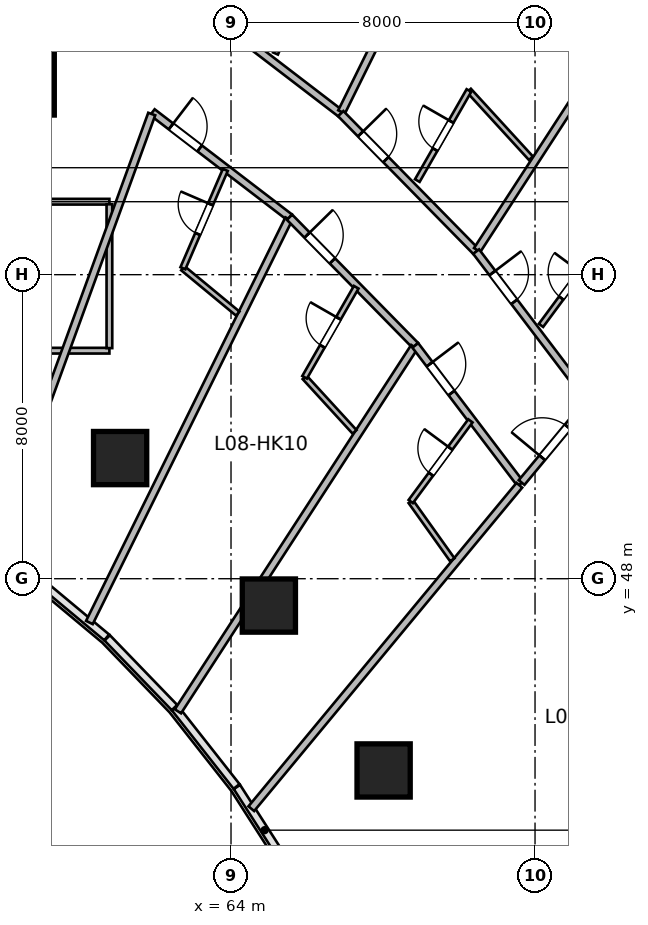
"""IFC4 building model, lengths in metres.
Left out: names, types, materials, properties, quantities, classifications, styles, units other than length and angle.
Written with IfcOpenShell. Run it as: python <this file> out.ifc"""

import sys

from ifc_helpers import new_model, si_unit, direction, frame, frame_2d, origin, origin_2d, place, context, subcontext, project, spatial, rectangle, circle, extrude, source, transform, mapped, element, fill, save


model = new_model("IFC4")
c1 = context("Model", 3, precision=1e-05, world=origin(), true_north=direction((0.0, 1.0)))
c2 = subcontext(c1, "Body", "Model", "MODEL_VIEW")
j1 = project(units=[si_unit("LENGTHUNIT", "METRE"), si_unit("PLANEANGLEUNIT", "RADIAN")], contexts=[c1])
p1 = place(None, origin())
s1 = spatial("IfcSite", under=j1, at=p1, CompositionType="ELEMENT")
p2 = place(p1, origin())
s2 = spatial("IfcBuilding", under=s1, at=p2, CompositionType="ELEMENT")
p3 = place(p2, frame((0.0, 0.0, 42.6)))
s3 = spatial("IfcBuildingStorey", under=s2, at=p3, CompositionType="ELEMENT", Elevation=42.6)
m1 = source(origin(), c2, "Body", "SweptSolid", [
    extrude(rectangle(XDim=12.0, YDim=0.55, at=frame_2d((6.0, 0.0))), origin(), (0.0, 0.0, 1.0), 3.6),
])
p4 = place(p3, frame((59.075, 60.2, 0.0), z_axis=(0.0, 0.0, 1.0), x_axis=(0.0, 1.0, 0.0)))
e1 = element("IfcWall", 1, at=p4, inside=s3, PredefinedType="SHEAR", context=c2, shape_type="MappedRepresentation", body=[
    mapped(m1, transform((0.0, 0.0, 0.0), scale=1.0)),
])
m2 = source(origin(), c2, "Body", "SweptSolid", [
    extrude(circle(Radius=0.7, at=origin_2d()), origin(), (0.0, 0.0, 1.0), 3.6),
])
for number, where, z_axis, x_axis in (
    (2, (61.082, 51.175, 0.0), (0.0, 0.0, 1.0), (0.409, 0.912, 0.0)),
    (3, (64.996, 47.294, 0.0), (0.0, 0.0, 1.0), (0.558, 0.83, 0.0)),
    (4, (68.015, 42.955, 0.0), (0.0, 0.0, 1.0), (0.691, 0.723, 0.0)),
):
    element("IfcColumn", number, at=place(p3, frame(where, z_axis=z_axis, x_axis=x_axis)), inside=s3, PredefinedType="COLUMN", context=c2, shape_type="MappedRepresentation", body=[
        mapped(m2, transform((0.0, 0.0, 0.0), scale=1.0)),
    ])
m3 = source(origin(), c2, "Body", "SweptSolid", [
    extrude(rectangle(XDim=6.6, YDim=0.15, at=frame_2d((3.3, 0.0))), origin(), (0.0, 0.0, 1.0), 2.803),
])
p5 = place(p3, frame((54.2, 54.0, 0.0), z_axis=(0.0, 0.0, 1.0), x_axis=(1.0, 0.0, 0.0)))
e5 = element("IfcWall", 5, at=p5, inside=s3, PredefinedType="PARTITIONING", context=c2, shape_type="MappedRepresentation", body=[
    mapped(m3, transform((0.0, 0.0, 0.0), scale=1.0)),
])
m4 = source(origin(), c2, "Body", "SweptSolid", [
    extrude(rectangle(XDim=6.6, YDim=0.15, at=frame_2d((3.3, 0.0))), origin(), (0.0, 0.0, 1.0), 3.36),
])
p6 = place(p3, frame((54.2, 57.92, 0.0), z_axis=(0.0, 0.0, 1.0), x_axis=(1.0, 0.0, 0.0)))
e6 = element("IfcWall", 6, at=p6, inside=s3, PredefinedType="PARTITIONING", context=c2, shape_type="MappedRepresentation", body=[
    mapped(m4, transform((0.0, 0.0, 0.0), scale=1.0)),
])
p7 = place(p6, frame((2.825, 0.0, 0.0)))
e7 = element("IfcOpeningElement", 7, at=p7, cuts=e6, PredefinedType="OPENING", context=c2, shape_type="SweptSolid", body=[
    extrude(rectangle(XDim=0.95, YDim=2.1, at=frame_2d((0.475, 1.05))), frame((0.0, 0.085, 0.0), z_axis=(0.0, -1.0, 0.0), x_axis=(1.0, 0.0, 0.0)), (0.0, 0.0, 1.0), 0.17),
])
m5 = source(origin(), c2, "Body", "SweptSolid", [
    extrude(rectangle(XDim=3.785, YDim=0.15, at=frame_2d((1.893, 0.0))), origin(), (0.0, 0.0, 1.0), 3.36),
])
p8 = place(p3, frame((60.8, 54.067, 0.0), z_axis=(0.0, 0.0, 1.0), x_axis=(0.0, 1.0, 0.0)))
e8 = element("IfcWall", 8, at=p8, inside=s3, PredefinedType="PARTITIONING", context=c2, shape_type="MappedRepresentation", body=[
    mapped(m5, transform((0.0, 0.0, 0.0), scale=1.0)),
])
m6 = source(origin(), c2, "Body", "SweptSolid", [
    extrude(rectangle(XDim=4.895, YDim=0.195, at=frame_2d((2.447, 0.0))), origin(), (0.0, 0.0, 1.0), 3.36),
])
p9 = place(p3, frame((63.001, 63.214, 0.0), z_axis=(0.0, 0.0, 1.0), x_axis=(0.793896075849, -0.608053468661, 0.0)))
e9 = element("IfcWall", 9, at=p9, inside=s3, PredefinedType="PARTITIONING", context=c2, shape_type="MappedRepresentation", body=[
    mapped(m6, transform((0.0, 0.0, 0.0), scale=1.0)),
])
p10 = place(p9, frame((0.7, 0.0, 0.0)))
e10 = element("IfcOpeningElement", 10, at=p10, cuts=e9, PredefinedType="OPENING", context=c2, shape_type="SweptSolid", body=[
    extrude(rectangle(XDim=0.95, YDim=2.15, at=frame_2d((0.475, 1.075))), frame((0.0, 0.107, 0.0), z_axis=(0.0, -1.0, 0.0), x_axis=(1.0, 0.0, 0.0)), (0.0, 0.0, 1.0), 0.215),
])
m7 = source(origin(), c2, "Body", "SweptSolid", [
    extrude(rectangle(XDim=11.77, YDim=0.195, at=frame_2d((5.885, 0.0))), origin(), (0.0, 0.0, 1.0), 3.36),
])
p11 = place(p3, frame((66.909, 60.282, 0.0), z_axis=(0.0, 0.0, 1.0), x_axis=(0.44286060326, 0.896590478468, 0.0)))
e11 = element("IfcWall", 11, at=p11, inside=s3, PredefinedType="PARTITIONING", context=c2, shape_type="MappedRepresentation", body=[
    mapped(m7, transform((0.0, 0.0, 0.0), scale=1.0)),
])
m8 = source(origin(), c2, "Body", "SweptSolid", [
    extrude(rectangle(XDim=2.818, YDim=0.14, at=frame_2d((1.409, 0.0))), origin(), (0.0, 0.0, 1.0), 3.36),
])
p12 = place(p3, frame((65.17, 61.819, 0.0), z_axis=(0.0, 0.0, 1.0), x_axis=(0.395894859341, 0.918295845764, 0.0)))
e12 = element("IfcWall", 12, at=p12, inside=s3, PredefinedType="PARTITIONING", context=c2, shape_type="MappedRepresentation", body=[
    mapped(m8, transform((0.0, 0.0, 0.0), scale=1.0)),
])
p13 = place(p12, frame((0.984, 0.0, 0.0)))
e13 = element("IfcOpeningElement", 13, at=p13, cuts=e12, PredefinedType="OPENING", context=c2, shape_type="SweptSolid", body=[
    extrude(rectangle(XDim=0.85, YDim=2.05, at=frame_2d((0.425, 1.025))), frame((0.0, 0.08, 0.0), z_axis=(0.0, -1.0, 0.0), x_axis=(1.0, 0.0, 0.0)), (0.0, 0.0, 1.0), 0.16),
])
m9 = source(origin(), c2, "Body", "SweptSolid", [
    extrude(rectangle(XDim=4.546, YDim=0.195, at=frame_2d((2.273, 0.0))), origin(), (0.0, 0.0, 1.0), 3.36),
])
p14 = place(p3, frame((61.931, 60.275, 0.0), z_axis=(0.0, 0.0, 1.0), x_axis=(0.793907931297, -0.608037989457, 0.0)))
e14 = element("IfcWall", 14, at=p14, inside=s3, PredefinedType="PARTITIONING", context=c2, shape_type="MappedRepresentation", body=[
    mapped(m9, transform((0.0, 0.0, 0.0), scale=1.0)),
])
p15 = place(p14, frame((0.616, 0.0, 0.0)))
e15 = element("IfcOpeningElement", 15, at=p15, cuts=e14, PredefinedType="OPENING", context=c2, shape_type="SweptSolid", body=[
    extrude(rectangle(XDim=0.95, YDim=2.15, at=frame_2d((0.475, 1.075))), frame((0.0, 0.107, 0.0), z_axis=(0.0, -1.0, 0.0), x_axis=(1.0, 0.0, 0.0)), (0.0, 0.0, 1.0), 0.215),
])
m10 = source(origin(), c2, "Body", "SweptSolid", [
    extrude(rectangle(XDim=12.196, YDim=0.195, at=frame_2d((6.098, 0.0))), origin(), (0.0, 0.0, 1.0), 3.36),
])
p16 = place(p3, frame((57.742, 48.766, 0.0), z_axis=(0.0, 0.0, 1.0), x_axis=(0.342022711534, 0.939691686031, 0.0)))
e16 = element("IfcWall", 16, at=p16, inside=s3, PredefinedType="PARTITIONING", context=c2, shape_type="MappedRepresentation", body=[
    mapped(m10, transform((0.0, 0.0, 0.0), scale=1.0)),
])
m11 = source(origin(), c2, "Body", "SweptSolid", [
    extrude(rectangle(XDim=11.844, YDim=0.195, at=frame_2d((5.922, 0.0))), origin(), (0.0, 0.0, 1.0), 3.36),
])
p17 = place(p3, frame((60.273, 46.848, 0.0), z_axis=(0.0, 0.0, 1.0), x_axis=(0.442871152218, 0.896585267854, 0.0)))
e17 = element("IfcWall", 17, at=p17, inside=s3, PredefinedType="PARTITIONING", context=c2, shape_type="MappedRepresentation", body=[
    mapped(m11, transform((0.0, 0.0, 0.0), scale=1.0)),
])
m12 = source(origin(), c2, "Body", "SweptSolid", [
    extrude(rectangle(XDim=1.873, YDim=0.14, at=frame_2d((0.937, 0.0))), origin(), (0.0, 0.0, 1.0), 3.36),
])
p18 = place(p3, frame((62.734, 56.169, 0.0), z_axis=(0.0, 0.0, 1.0), x_axis=(0.77069451688, -0.637204803537, 0.0)))
e18 = element("IfcWall", 18, at=p18, inside=s3, PredefinedType="PARTITIONING", context=c2, shape_type="MappedRepresentation", body=[
    mapped(m12, transform((0.0, 0.0, 0.0), scale=1.0)),
])
m13 = source(origin(), c2, "Body", "SweptSolid", [
    extrude(rectangle(XDim=2.817, YDim=0.14, at=frame_2d((1.409, 0.0))), origin(), (0.0, 0.0, 1.0), 3.36),
])
p19 = place(p3, frame((62.734, 56.169, 0.0), z_axis=(0.0, 0.0, 1.0), x_axis=(0.395999429727, 0.918250756415, 0.0)))
e19 = element("IfcWall", 19, at=p19, inside=s3, PredefinedType="PARTITIONING", context=c2, shape_type="MappedRepresentation", body=[
    mapped(m13, transform((0.0, 0.0, 0.0), scale=1.0)),
])
p20 = place(p19, frame((0.984, 0.0, 0.0)))
e20 = element("IfcOpeningElement", 20, at=p20, cuts=e19, PredefinedType="OPENING", context=c2, shape_type="SweptSolid", body=[
    extrude(rectangle(XDim=0.85, YDim=2.05, at=frame_2d((0.425, 1.025))), frame((0.0, 0.08, 0.0), z_axis=(0.0, -1.0, 0.0), x_axis=(1.0, 0.0, 0.0)), (0.0, 0.0, 1.0), 0.16),
])
m14 = source(origin(), c2, "Body", "SweptSolid", [
    extrude(rectangle(XDim=5.087, YDim=0.195, at=frame_2d((2.543, 0.0))), origin(), (0.0, 0.0, 1.0), 3.36),
])
p21 = place(p3, frame((66.887, 60.238, 0.0), z_axis=(0.0, 0.0, 1.0), x_axis=(0.700428330775, -0.7137227427, 0.0)))
e21 = element("IfcWall", 21, at=p21, inside=s3, PredefinedType="PARTITIONING", context=c2, shape_type="MappedRepresentation", body=[
    mapped(m14, transform((0.0, 0.0, 0.0), scale=1.0)),
])
p22 = place(p21, frame((0.746, 0.0, 0.0)))
e22 = element("IfcOpeningElement", 22, at=p22, cuts=e21, PredefinedType="OPENING", context=c2, shape_type="SweptSolid", body=[
    extrude(rectangle(XDim=0.95, YDim=2.15, at=frame_2d((0.475, 1.075))), frame((0.0, 0.107, 0.0), z_axis=(0.0, -1.0, 0.0), x_axis=(1.0, 0.0, 0.0)), (0.0, 0.0, 1.0), 0.215),
])
m15 = source(origin(), c2, "Body", "SweptSolid", [
    extrude(rectangle(XDim=11.403, YDim=0.195, at=frame_2d((5.701, 0.0))), origin(), (0.0, 0.0, 1.0), 3.36),
])
p23 = place(p3, frame((70.477, 56.647, 0.0), z_axis=(0.0, 0.0, 1.0), x_axis=(0.544246090008, 0.838925618581, 0.0)))
e23 = element("IfcWall", 23, at=p23, inside=s3, PredefinedType="PARTITIONING", context=c2, shape_type="MappedRepresentation", body=[
    mapped(m15, transform((0.0, 0.0, 0.0), scale=1.0)),
])
m16 = source(origin(), c2, "Body", "SweptSolid", [
    extrude(rectangle(XDim=2.416, YDim=0.14, at=frame_2d((1.208, 0.0))), origin(), (0.0, 0.0, 1.0), 3.36),
])
p24 = place(p3, frame((70.26, 60.846, 0.0), z_axis=(0.0, 0.0, 1.0), x_axis=(0.675399637907, -0.737451916476, 0.0)))
e24 = element("IfcWall", 24, at=p24, inside=s3, PredefinedType="PARTITIONING", context=c2, shape_type="MappedRepresentation", body=[
    mapped(m16, transform((0.0, 0.0, 0.0), scale=1.0)),
])
m17 = source(origin(), c2, "Body", "SweptSolid", [
    extrude(rectangle(XDim=2.732, YDim=0.14, at=frame_2d((1.366, 0.0))), origin(), (0.0, 0.0, 1.0), 3.36),
])
p25 = place(p3, frame((68.902, 58.476, 0.0), z_axis=(0.0, 0.0, 1.0), x_axis=(0.497254966372, 0.867604459658, 0.0)))
e25 = element("IfcWall", 25, at=p25, inside=s3, PredefinedType="PARTITIONING", context=c2, shape_type="MappedRepresentation", body=[
    mapped(m17, transform((0.0, 0.0, 0.0), scale=1.0)),
])
p26 = place(p25, frame((0.941, 0.0, 0.0)))
e26 = element("IfcOpeningElement", 26, at=p26, cuts=e25, PredefinedType="OPENING", context=c2, shape_type="SweptSolid", body=[
    extrude(rectangle(XDim=0.85, YDim=2.05, at=frame_2d((0.425, 1.025))), frame((0.0, 0.08, 0.0), z_axis=(0.0, -1.0, 0.0), x_axis=(1.0, 0.0, 0.0)), (0.0, 0.0, 1.0), 0.16),
])
m18 = source(origin(), c2, "Body", "SweptSolid", [
    extrude(rectangle(XDim=4.724, YDim=0.195, at=frame_2d((2.362, 0.0))), origin(), (0.0, 0.0, 1.0), 3.36),
])
p27 = place(p3, frame((65.541, 57.511, 0.0), z_axis=(0.0, 0.0, 1.0), x_axis=(0.700435057457, -0.713716141253, 0.0)))
e27 = element("IfcWall", 27, at=p27, inside=s3, PredefinedType="PARTITIONING", context=c2, shape_type="MappedRepresentation", body=[
    mapped(m18, transform((0.0, 0.0, 0.0), scale=1.0)),
])
p28 = place(p27, frame((0.659, 0.0, 0.0)))
e28 = element("IfcOpeningElement", 28, at=p28, cuts=e27, PredefinedType="OPENING", context=c2, shape_type="SweptSolid", body=[
    extrude(rectangle(XDim=0.95, YDim=2.15, at=frame_2d((0.475, 1.075))), frame((0.0, 0.107, 0.0), z_axis=(0.0, -1.0, 0.0), x_axis=(1.0, 0.0, 0.0)), (0.0, 0.0, 1.0), 0.215),
])
m19 = source(origin(), c2, "Body", "SweptSolid", [
    extrude(rectangle(XDim=11.429, YDim=0.195, at=frame_2d((5.714, 0.0))), origin(), (0.0, 0.0, 1.0), 3.36),
])
p29 = place(p3, frame((62.604, 44.511, 0.0), z_axis=(0.0, 0.0, 1.0), x_axis=(0.544215487077, 0.838945471187, 0.0)))
e29 = element("IfcWall", 29, at=p29, inside=s3, PredefinedType="PARTITIONING", context=c2, shape_type="MappedRepresentation", body=[
    mapped(m19, transform((0.0, 0.0, 0.0), scale=1.0)),
])
m20 = source(origin(), c2, "Body", "SweptSolid", [
    extrude(rectangle(XDim=1.947, YDim=0.14, at=frame_2d((0.973, 0.0))), origin(), (0.0, 0.0, 1.0), 2.803),
])
p30 = place(p3, frame((65.936, 53.3, 0.0), z_axis=(0.0, 0.0, 1.0), x_axis=(0.675383794012, -0.737466426888, 0.0)))
e30 = element("IfcWall", 30, at=p30, inside=s3, PredefinedType="PARTITIONING", context=c2, shape_type="MappedRepresentation", body=[
    mapped(m20, transform((0.0, 0.0, 0.0), scale=1.0)),
])
m21 = source(origin(), c2, "Body", "SweptSolid", [
    extrude(rectangle(XDim=2.731, YDim=0.14, at=frame_2d((1.366, 0.0))), origin(), (0.0, 0.0, 1.0), 3.36),
])
p31 = place(p3, frame((65.936, 53.3, 0.0), z_axis=(0.0, 0.0, 1.0), x_axis=(0.497120404056, 0.867681568244, 0.0)))
e31 = element("IfcWall", 31, at=p31, inside=s3, PredefinedType="PARTITIONING", context=c2, shape_type="MappedRepresentation", body=[
    mapped(m21, transform((0.0, 0.0, 0.0), scale=1.0)),
])
p32 = place(p31, frame((0.941, 0.0, 0.0)))
e32 = element("IfcOpeningElement", 32, at=p32, cuts=e31, PredefinedType="OPENING", context=c2, shape_type="SweptSolid", body=[
    extrude(rectangle(XDim=0.85, YDim=2.05, at=frame_2d((0.425, 1.025))), frame((0.0, 0.08, 0.0), z_axis=(0.0, -1.0, 0.0), x_axis=(1.0, 0.0, 0.0)), (0.0, 0.0, 1.0), 0.16),
])
m22 = source(origin(), c2, "Body", "SweptSolid", [
    extrude(rectangle(XDim=4.928, YDim=0.195, at=frame_2d((2.464, 0.0))), origin(), (0.0, 0.0, 1.0), 3.36),
])
p33 = place(p3, frame((70.45, 56.607, 0.0), z_axis=(0.0, 0.0, 1.0), x_axis=(0.604793043708, -0.796382680803, 0.0)))
e33 = element("IfcWall", 33, at=p33, inside=s3, PredefinedType="PARTITIONING", context=c2, shape_type="MappedRepresentation", body=[
    mapped(m22, transform((0.0, 0.0, 0.0), scale=1.0)),
])
p34 = place(p33, frame((0.708, 0.0, 0.0)))
e34 = element("IfcOpeningElement", 34, at=p34, cuts=e33, PredefinedType="OPENING", context=c2, shape_type="SweptSolid", body=[
    extrude(rectangle(XDim=0.95, YDim=2.15, at=frame_2d((0.475, 1.075))), frame((0.0, 0.107, 0.0), z_axis=(0.0, -1.0, 0.0), x_axis=(1.0, 0.0, 0.0)), (0.0, 0.0, 1.0), 0.215),
])
m23 = source(origin(), c2, "Body", "SweptSolid", [
    extrude(rectangle(XDim=2.64, YDim=0.14, at=frame_2d((1.32, 0.0))), origin(), (0.0, 0.0, 1.0), 3.36),
])
p35 = place(p3, frame((72.157, 54.666, 0.0), z_axis=(0.0, 0.0, 1.0), x_axis=(0.594630255283, 0.803999290735, 0.0)))
e35 = element("IfcWall", 35, at=p35, inside=s3, PredefinedType="PARTITIONING", context=c2, shape_type="MappedRepresentation", body=[
    mapped(m23, transform((0.0, 0.0, 0.0), scale=1.0)),
])
p36 = place(p35, frame((0.895, 0.0, 0.0)))
e36 = element("IfcOpeningElement", 36, at=p36, cuts=e35, PredefinedType="OPENING", context=c2, shape_type="SweptSolid", body=[
    extrude(rectangle(XDim=0.85, YDim=2.05, at=frame_2d((0.425, 1.025))), frame((0.0, 0.08, 0.0), z_axis=(0.0, -1.0, 0.0), x_axis=(1.0, 0.0, 0.0)), (0.0, 0.0, 1.0), 0.16),
])
m24 = source(origin(), c2, "Body", "SweptSolid", [
    extrude(rectangle(XDim=4.576, YDim=0.195, at=frame_2d((2.288, 0.0))), origin(), (0.0, 0.0, 1.0), 3.36),
])
p37 = place(p3, frame((68.85, 54.139, 0.0), z_axis=(0.0, 0.0, 1.0), x_axis=(0.604795096156, -0.796381122118, 0.0)))
e37 = element("IfcWall", 37, at=p37, inside=s3, PredefinedType="PARTITIONING", context=c2, shape_type="MappedRepresentation", body=[
    mapped(m24, transform((0.0, 0.0, 0.0), scale=1.0)),
])
p38 = place(p37, frame((0.623, 0.0, 0.0)))
e38 = element("IfcOpeningElement", 38, at=p38, cuts=e37, PredefinedType="OPENING", context=c2, shape_type="SweptSolid", body=[
    extrude(rectangle(XDim=0.95, YDim=2.15, at=frame_2d((0.475, 1.075))), frame((0.0, 0.107, 0.0), z_axis=(0.0, -1.0, 0.0), x_axis=(1.0, 0.0, 0.0)), (0.0, 0.0, 1.0), 0.215),
])
m25 = source(origin(), c2, "Body", "SweptSolid", [
    extrude(rectangle(XDim=11.053, YDim=0.195, at=frame_2d((5.527, 0.0))), origin(), (0.0, 0.0, 1.0), 3.36),
])
p39 = place(p3, frame((64.534, 41.949, 0.0), z_axis=(0.0, 0.0, 1.0), x_axis=(0.638131235571, 0.769927611005, 0.0)))
e39 = element("IfcWall", 39, at=p39, inside=s3, PredefinedType="PARTITIONING", context=c2, shape_type="MappedRepresentation", body=[
    mapped(m25, transform((0.0, 0.0, 0.0), scale=1.0)),
])
m26 = source(origin(), c2, "Body", "SweptSolid", [
    extrude(rectangle(XDim=1.884, YDim=0.14, at=frame_2d((0.942, 0.0))), origin(), (0.0, 0.0, 1.0), 2.803),
])
p40 = place(p3, frame((68.729, 50.031, 0.0), z_axis=(0.0, 0.0, 1.0), x_axis=(0.580833492897, -0.814022391295, 0.0)))
e40 = element("IfcWall", 40, at=p40, inside=s3, PredefinedType="PARTITIONING", context=c2, shape_type="MappedRepresentation", body=[
    mapped(m26, transform((0.0, 0.0, 0.0), scale=1.0)),
])
p41 = place(p3, frame((68.729, 50.031, 0.0), z_axis=(0.0, 0.0, 1.0), x_axis=(0.594674469522, 0.803966588422, 0.0)))
e41 = element("IfcWall", 41, at=p41, inside=s3, PredefinedType="PARTITIONING", context=c2, shape_type="MappedRepresentation", body=[
    mapped(m23, transform((0.0, 0.0, 0.0), scale=1.0)),
])
p42 = place(p41, frame((0.895, 0.0, 0.0)))
e42 = element("IfcOpeningElement", 42, at=p42, cuts=e41, PredefinedType="OPENING", context=c2, shape_type="SweptSolid", body=[
    extrude(rectangle(XDim=0.85, YDim=2.05, at=frame_2d((0.425, 1.025))), frame((0.0, 0.08, 0.0), z_axis=(0.0, -1.0, 0.0), x_axis=(1.0, 0.0, 0.0)), (0.0, 0.0, 1.0), 0.16),
])
m27 = source(origin(), c2, "Body", "SweptSolid", [
    extrude(rectangle(XDim=2.748, YDim=0.195, at=frame_2d((1.374, 0.0))), origin(), (0.0, 0.0, 1.0), 3.36),
])
p43 = place(p3, frame((71.647, 50.531, 0.0), z_axis=(0.0, 0.0, 1.0), x_axis=(0.638111168284, 0.769944242729, 0.0)))
e43 = element("IfcWall", 43, at=p43, inside=s3, PredefinedType="PARTITIONING", context=c2, shape_type="MappedRepresentation", body=[
    mapped(m27, transform((0.0, 0.0, 0.0), scale=1.0)),
])
p44 = place(p43, frame((0.849, 0.0, 0.0)))
e44 = element("IfcOpeningElement", 44, at=p44, cuts=e43, PredefinedType="OPENING", context=c2, shape_type="SweptSolid", body=[
    extrude(rectangle(XDim=1.05, YDim=2.15, at=frame_2d((0.525, 1.075))), frame((0.0, 0.107, 0.0), z_axis=(0.0, -1.0, 0.0), x_axis=(1.0, 0.0, 0.0)), (0.0, 0.0, 1.0), 0.215),
])
m28 = source(origin(), c2, "Body", "SweptSolid", [
    extrude(rectangle(XDim=0.95, YDim=2.15, at=frame_2d((0.475, 1.075))), frame((0.0, 0.025, 0.0), z_axis=(0.0, -1.0, 0.0), x_axis=(1.0, 0.0, 0.0)), (0.0, 0.0, 1.0), 0.05),
])
p45 = place(p15, origin())
e45 = element("IfcDoor", 45, at=p45, inside=s3, OperationType="SINGLE_SWING_LEFT", PredefinedType="DOOR", context=c2, shape_type="MappedRepresentation", body=[
    mapped(m28, transform((0.0, 0.0, 0.0), scale=1.0)),
])
fill(e15, e45)
m29 = source(origin(), c2, "Body", "SweptSolid", [
    extrude(rectangle(XDim=0.85, YDim=2.05, at=frame_2d((0.425, 1.025))), frame((0.0, 0.025, 0.0), z_axis=(0.0, -1.0, 0.0), x_axis=(1.0, 0.0, 0.0)), (0.0, 0.0, 1.0), 0.05),
])
p46 = place(p20, origin())
e46 = element("IfcDoor", 46, at=p46, inside=s3, OperationType="SINGLE_SWING_RIGHT", PredefinedType="DOOR", context=c2, shape_type="MappedRepresentation", body=[
    mapped(m29, transform((0.0, 0.0, 0.0), scale=1.0)),
])
fill(e20, e46)
p47 = place(p22, origin())
e47 = element("IfcDoor", 47, at=p47, inside=s3, OperationType="SINGLE_SWING_LEFT", PredefinedType="DOOR", context=c2, shape_type="MappedRepresentation", body=[
    mapped(m28, transform((0.0, 0.0, 0.0), scale=1.0)),
])
fill(e22, e47)
p48 = place(p26, origin())
e48 = element("IfcDoor", 48, at=p48, inside=s3, OperationType="SINGLE_SWING_RIGHT", PredefinedType="DOOR", context=c2, shape_type="MappedRepresentation", body=[
    mapped(m29, transform((0.0, 0.0, 0.0), scale=1.0)),
])
fill(e26, e48)
p49 = place(p28, origin())
e49 = element("IfcDoor", 49, at=p49, inside=s3, OperationType="SINGLE_SWING_LEFT", PredefinedType="DOOR", context=c2, shape_type="MappedRepresentation", body=[
    mapped(m28, transform((0.0, 0.0, 0.0), scale=1.0)),
])
fill(e28, e49)
p50 = place(p32, origin())
e50 = element("IfcDoor", 50, at=p50, inside=s3, OperationType="SINGLE_SWING_RIGHT", PredefinedType="DOOR", context=c2, shape_type="MappedRepresentation", body=[
    mapped(m29, transform((0.0, 0.0, 0.0), scale=1.0)),
])
fill(e32, e50)
p51 = place(p34, origin())
e51 = element("IfcDoor", 51, at=p51, inside=s3, OperationType="SINGLE_SWING_LEFT", PredefinedType="DOOR", context=c2, shape_type="MappedRepresentation", body=[
    mapped(m28, transform((0.0, 0.0, 0.0), scale=1.0)),
])
fill(e34, e51)
p52 = place(p36, origin())
e52 = element("IfcDoor", 52, at=p52, inside=s3, OperationType="SINGLE_SWING_RIGHT", PredefinedType="DOOR", context=c2, shape_type="MappedRepresentation", body=[
    mapped(m29, transform((0.0, 0.0, 0.0), scale=1.0)),
])
fill(e36, e52)
p53 = place(p38, origin())
e53 = element("IfcDoor", 53, at=p53, inside=s3, OperationType="SINGLE_SWING_LEFT", PredefinedType="DOOR", context=c2, shape_type="MappedRepresentation", body=[
    mapped(m28, transform((0.0, 0.0, 0.0), scale=1.0)),
])
fill(e38, e53)
p54 = place(p42, origin())
e54 = element("IfcDoor", 54, at=p54, inside=s3, OperationType="SINGLE_SWING_RIGHT", PredefinedType="DOOR", context=c2, shape_type="MappedRepresentation", body=[
    mapped(m29, transform((0.0, 0.0, 0.0), scale=1.0)),
])
fill(e42, e54)
m30 = source(origin(), c2, "Body", "SweptSolid", [
    extrude(rectangle(XDim=1.05, YDim=2.15, at=frame_2d((0.525, 1.075))), frame((0.0, 0.025, 0.0), z_axis=(0.0, -1.0, 0.0), x_axis=(1.0, 0.0, 0.0)), (0.0, 0.0, 1.0), 0.05),
])
p55 = place(p44, origin())
e55 = element("IfcDoor", 55, at=p55, inside=s3, OperationType="SINGLE_SWING_LEFT", PredefinedType="DOOR", context=c2, shape_type="MappedRepresentation", body=[
    mapped(m30, transform((0.0, 0.0, 0.0), scale=1.0)),
])
fill(e44, e55)
save(model, sys.argv[1])
